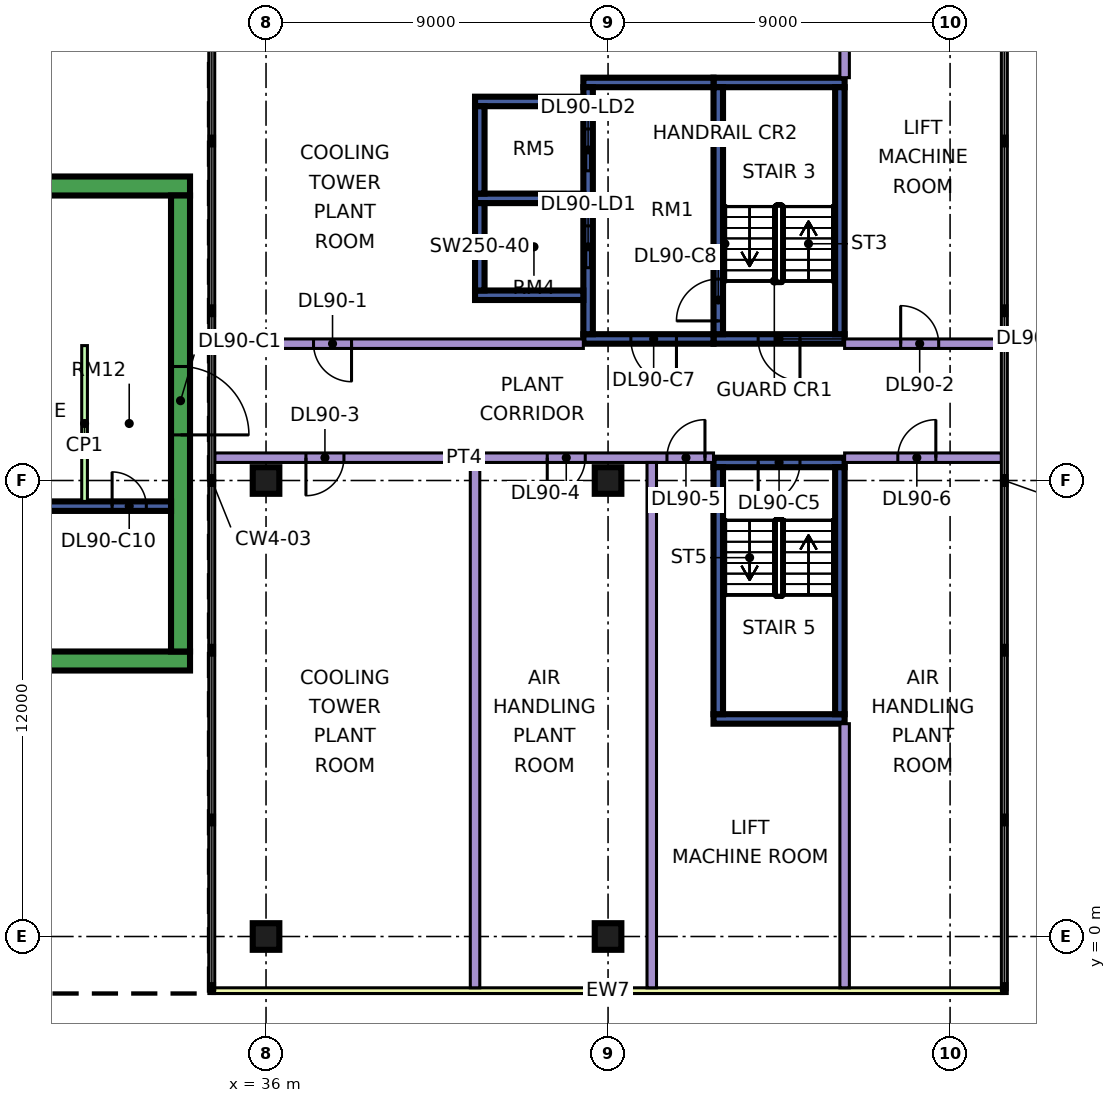
"""IFC4 building model, lengths in metres.
Left out: names, types, materials, properties, quantities, classifications, styles, units other than length and angle.
Written with IfcOpenShell. Run it as: python <this file> out.ifc"""

import sys

from ifc_helpers import new_model, si_unit, direction, frame, frame_2d, origin, origin_2d, place, context, subcontext, project, spatial, rectangle, extrude, element, fill, save


model = new_model("IFC4")
c1 = context("Model", 3, precision=1e-05, world=origin(), true_north=direction((0.0, 1.0)))
c2 = subcontext(c1, "Body", "Model", "MODEL_VIEW")
j1 = project(units=[si_unit("LENGTHUNIT", "METRE"), si_unit("PLANEANGLEUNIT", "RADIAN")], contexts=[c1])
p1 = place(None, origin())
s1 = spatial("IfcSite", under=j1, at=p1, CompositionType="ELEMENT")
p2 = place(p1, origin())
s2 = spatial("IfcBuilding", under=s1, at=p2, CompositionType="ELEMENT")
p3 = place(p2, frame((0.0, 0.0, 383.9)))
s3 = spatial("IfcBuildingStorey", under=s2, at=p3, CompositionType="ELEMENT", Elevation=383.9)
for number, where, z_axis, x_axis in (
    (1, (36.0, 0.0, 0.0), (0.0, 0.0, 1.0), (1.0, 0.0, 0.0)),
    (2, (36.0, 12.0, 0.0), (0.0, 0.0, 1.0), (1.0, 0.0, 0.0)),
    (3, (45.0, 0.0, 0.0), (0.0, 0.0, 1.0), (1.0, 0.0, 0.0)),
    (4, (45.0, 12.0, 0.0), (0.0, 0.0, 1.0), (1.0, 0.0, 0.0)),
):
    element("IfcColumn", number, at=place(p3, frame(where, z_axis=z_axis, x_axis=x_axis)), inside=s3, PredefinedType="COLUMN", context=c2, shape_type="SweptSolid", body=[
        extrude(rectangle(XDim=0.7, YDim=0.7, at=origin_2d()), origin(), (0.0, 0.0, 1.0), 5.0),
    ])
for number, where, z_axis, x_axis in (
    (5, (9.0, 7.25, 0.0), (0.0, 0.0, 1.0), (1.0, 0.0, 0.0)),
    (6, (9.0, 19.75, 0.0), (0.0, 0.0, 1.0), (1.0, 0.0, 0.0)),
):
    element("IfcWall", number, at=place(p3, frame(where, z_axis=z_axis, x_axis=x_axis)), inside=s3, PredefinedType="SHEAR", context=c2, shape_type="SweptSolid", body=[
        extrude(rectangle(XDim=25.0, YDim=0.5, at=frame_2d((12.5, 0.0))), origin(), (0.0, 0.0, 1.0), 5.0),
    ])
p4 = place(p3, frame((33.75, 7.5, 0.0), z_axis=(0.0, 0.0, 1.0), x_axis=(0.0, 1.0, 0.0)))
e7 = element("IfcWall", 7, at=p4, inside=s3, PredefinedType="SHEAR", context=c2, shape_type="SweptSolid", body=[
    extrude(rectangle(XDim=12.0, YDim=0.5, at=frame_2d((6.0, 0.0))), origin(), (0.0, 0.0, 1.0), 5.0),
])
p5 = place(p4, frame((5.7, 0.0, 0.0)))
e8 = element("IfcOpeningElement", 8, at=p5, cuts=e7, PredefinedType="OPENING", context=c2, shape_type="SweptSolid", body=[
    extrude(rectangle(XDim=1.8, YDim=2.4, at=frame_2d((0.9, 1.2))), frame((0.0, 0.26, 0.0), z_axis=(0.0, -1.0, 0.0), x_axis=(1.0, 0.0, 0.0)), (0.0, 0.0, 1.0), 0.52),
])
p6 = place(p3, frame((13.45, 11.325, 0.0), z_axis=(0.0, 0.0, 1.0), x_axis=(1.0, 0.0, 0.0)))
e9 = element("IfcWall", 9, at=p6, inside=s3, PredefinedType="SHEAR", context=c2, shape_type="SweptSolid", body=[
    extrude(rectangle(XDim=20.05, YDim=0.25, at=frame_2d((10.025, 0.0))), origin(), (0.0, 0.0, 1.0), 5.0),
])
p7 = place(p6, frame((4.1, 0.0, 0.0)))
e10 = element("IfcOpeningElement", 10, at=p7, cuts=e9, PredefinedType="OPENING", context=c2, shape_type="SweptSolid", body=[
    extrude(rectangle(XDim=0.9, YDim=2.1, at=frame_2d((0.45, 1.05))), frame((0.0, 0.135, 0.0), z_axis=(0.0, -1.0, 0.0), x_axis=(1.0, 0.0, 0.0)), (0.0, 0.0, 1.0), 0.27),
])
p8 = place(p6, frame((18.5, 0.0, 0.0)))
e11 = element("IfcOpeningElement", 11, at=p8, cuts=e9, PredefinedType="OPENING", context=c2, shape_type="SweptSolid", body=[
    extrude(rectangle(XDim=0.9, YDim=2.1, at=frame_2d((0.45, 1.05))), frame((0.0, 0.135, 0.0), z_axis=(0.0, -1.0, 0.0), x_axis=(1.0, 0.0, 0.0)), (0.0, 0.0, 1.0), 0.27),
])
p9 = place(p3, frame((47.775, 15.725, 0.0), z_axis=(0.0, 0.0, 1.0), x_axis=(1.0, 0.0, 0.0)))
e12 = element("IfcWall", 12, at=p9, inside=s3, PredefinedType="SHEAR", context=c2, shape_type="SweptSolid", body=[
    extrude(rectangle(XDim=3.45, YDim=0.25, at=frame_2d((1.725, 0.0))), origin(), (0.0, 0.0, 1.0), 5.0),
])
p10 = place(p9, frame((1.175, 0.0, 0.0)))
e13 = element("IfcOpeningElement", 13, at=p10, cuts=e12, PredefinedType="OPENING", context=c2, shape_type="SweptSolid", body=[
    extrude(rectangle(XDim=1.1, YDim=2.2, at=frame_2d((0.55, 1.1))), frame((0.0, 0.135, 0.0), z_axis=(0.0, -1.0, 0.0), x_axis=(1.0, 0.0, 0.0)), (0.0, 0.0, 1.0), 0.27),
])
p11 = place(p3, frame((47.775, 22.475, 0.0), z_axis=(0.0, 0.0, 1.0), x_axis=(1.0, 0.0, 0.0)))
e14 = element("IfcWall", 14, at=p11, inside=s3, PredefinedType="SHEAR", context=c2, shape_type="SweptSolid", body=[
    extrude(rectangle(XDim=3.45, YDim=0.25, at=frame_2d((1.725, 0.0))), origin(), (0.0, 0.0, 1.0), 5.0),
])
p12 = place(p3, frame((47.9, 15.85, 0.0), z_axis=(0.0, 0.0, 1.0), x_axis=(0.0, 1.0, 0.0)))
e15 = element("IfcWall", 15, at=p12, inside=s3, PredefinedType="SHEAR", context=c2, shape_type="SweptSolid", body=[
    extrude(rectangle(XDim=6.5, YDim=0.25, at=frame_2d((3.25, 0.0))), origin(), (0.0, 0.0, 1.0), 5.0),
])
p13 = place(p12, frame((0.35, 0.0, 0.0)))
e16 = element("IfcOpeningElement", 16, at=p13, cuts=e15, PredefinedType="OPENING", context=c2, shape_type="SweptSolid", body=[
    extrude(rectangle(XDim=1.1, YDim=2.2, at=frame_2d((0.55, 1.1))), frame((0.0, 0.135, 0.0), z_axis=(0.0, -1.0, 0.0), x_axis=(1.0, 0.0, 0.0)), (0.0, 0.0, 1.0), 0.27),
])
p14 = place(p3, frame((51.1, 15.85, 0.0), z_axis=(0.0, 0.0, 1.0), x_axis=(0.0, 1.0, 0.0)))
e17 = element("IfcWall", 17, at=p14, inside=s3, PredefinedType="SHEAR", context=c2, shape_type="SweptSolid", body=[
    extrude(rectangle(XDim=6.5, YDim=0.25, at=frame_2d((3.25, 0.0))), origin(), (0.0, 0.0, 1.0), 5.0),
])
p15 = place(p3, frame((47.775, 5.725, 0.0), z_axis=(0.0, 0.0, 1.0), x_axis=(1.0, 0.0, 0.0)))
e18 = element("IfcWall", 18, at=p15, inside=s3, PredefinedType="SHEAR", context=c2, shape_type="SweptSolid", body=[
    extrude(rectangle(XDim=3.45, YDim=0.25, at=frame_2d((1.725, 0.0))), origin(), (0.0, 0.0, 1.0), 5.0),
])
p16 = place(p3, frame((47.775, 12.475, 0.0), z_axis=(0.0, 0.0, 1.0), x_axis=(1.0, 0.0, 0.0)))
e19 = element("IfcWall", 19, at=p16, inside=s3, PredefinedType="SHEAR", context=c2, shape_type="SweptSolid", body=[
    extrude(rectangle(XDim=3.45, YDim=0.25, at=frame_2d((1.725, 0.0))), origin(), (0.0, 0.0, 1.0), 5.0),
])
p17 = place(p16, frame((1.175, 0.0, 0.0)))
e20 = element("IfcOpeningElement", 20, at=p17, cuts=e19, PredefinedType="OPENING", context=c2, shape_type="SweptSolid", body=[
    extrude(rectangle(XDim=1.1, YDim=2.2, at=frame_2d((0.55, 1.1))), frame((0.0, 0.135, 0.0), z_axis=(0.0, -1.0, 0.0), x_axis=(1.0, 0.0, 0.0)), (0.0, 0.0, 1.0), 0.27),
])
for number, where, z_axis, x_axis in (
    (21, (47.9, 5.85, 0.0), (0.0, 0.0, 1.0), (0.0, 1.0, 0.0)),
    (22, (51.1, 5.85, 0.0), (0.0, 0.0, 1.0), (0.0, 1.0, 0.0)),
):
    element("IfcWall", number, at=place(p3, frame(where, z_axis=z_axis, x_axis=x_axis)), inside=s3, PredefinedType="SHEAR", context=c2, shape_type="SweptSolid", body=[
        extrude(rectangle(XDim=6.5, YDim=0.25, at=frame_2d((3.25, 0.0))), origin(), (0.0, 0.0, 1.0), 5.0),
    ])
p18 = place(p3, frame((44.35, 15.725, 0.0), z_axis=(0.0, 0.0, 1.0), x_axis=(1.0, 0.0, 0.0)))
e23 = element("IfcWall", 23, at=p18, inside=s3, PredefinedType="SHEAR", context=c2, shape_type="SweptSolid", body=[
    extrude(rectangle(XDim=3.425, YDim=0.25, at=frame_2d((1.712, 0.0))), origin(), (0.0, 0.0, 1.0), 5.0),
])
p19 = place(p18, frame((1.25, 0.0, 0.0)))
e24 = element("IfcOpeningElement", 24, at=p19, cuts=e23, PredefinedType="OPENING", context=c2, shape_type="SweptSolid", body=[
    extrude(rectangle(XDim=1.2, YDim=2.2, at=frame_2d((0.6, 1.1))), frame((0.0, 0.135, 0.0), z_axis=(0.0, -1.0, 0.0), x_axis=(1.0, 0.0, 0.0)), (0.0, 0.0, 1.0), 0.27),
])
p20 = place(p3, frame((44.35, 22.475, 0.0), z_axis=(0.0, 0.0, 1.0), x_axis=(1.0, 0.0, 0.0)))
e25 = element("IfcWall", 25, at=p20, inside=s3, PredefinedType="SHEAR", context=c2, shape_type="SweptSolid", body=[
    extrude(rectangle(XDim=3.425, YDim=0.25, at=frame_2d((1.712, 0.0))), origin(), (0.0, 0.0, 1.0), 5.0),
])
p21 = place(p3, frame((44.475, 15.85, 0.0), z_axis=(0.0, 0.0, 1.0), x_axis=(0.0, 1.0, 0.0)))
e26 = element("IfcWall", 26, at=p21, inside=s3, PredefinedType="SHEAR", context=c2, shape_type="SweptSolid", body=[
    extrude(rectangle(XDim=6.5, YDim=0.25, at=frame_2d((3.25, 0.0))), origin(), (0.0, 0.0, 1.0), 5.0),
])
p22 = place(p21, frame((1.75, 0.0, 0.0)))
e27 = element("IfcOpeningElement", 27, at=p22, cuts=e26, PredefinedType="OPENING", context=c2, shape_type="SweptSolid", body=[
    extrude(rectangle(XDim=1.1, YDim=2.2, at=frame_2d((0.55, 1.1))), frame((0.0, 0.135, 0.0), z_axis=(0.0, -1.0, 0.0), x_axis=(1.0, 0.0, 0.0)), (0.0, 0.0, 1.0), 0.27),
])
p23 = place(p21, frame((4.3, 0.0, 0.0)))
e28 = element("IfcOpeningElement", 28, at=p23, cuts=e26, PredefinedType="OPENING", context=c2, shape_type="SweptSolid", body=[
    extrude(rectangle(XDim=1.1, YDim=2.2, at=frame_2d((0.55, 1.1))), frame((0.0, 0.135, 0.0), z_axis=(0.0, -1.0, 0.0), x_axis=(1.0, 0.0, 0.0)), (0.0, 0.0, 1.0), 0.27),
])
for number, where, z_axis, x_axis in (
    (29, (41.5, 16.875, 0.0), (0.0, 0.0, 1.0), (1.0, 0.0, 0.0)),
    (30, (41.5, 19.425, 0.0), (0.0, 0.0, 1.0), (1.0, 0.0, 0.0)),
    (31, (41.5, 21.975, 0.0), (0.0, 0.0, 1.0), (1.0, 0.0, 0.0)),
):
    element("IfcWall", number, at=place(p3, frame(where, z_axis=z_axis, x_axis=x_axis)), inside=s3, PredefinedType="SHEAR", context=c2, shape_type="SweptSolid", body=[
        extrude(rectangle(XDim=2.85, YDim=0.25, at=frame_2d((1.425, 0.0))), origin(), (0.0, 0.0, 1.0), 5.0),
    ])
for number, where, z_axis, x_axis in (
    (32, (41.625, 17.0, 0.0), (0.0, 0.0, 1.0), (0.0, 1.0, 0.0)),
    (33, (41.625, 19.55, 0.0), (0.0, 0.0, 1.0), (0.0, 1.0, 0.0)),
):
    element("IfcWall", number, at=place(p3, frame(where, z_axis=z_axis, x_axis=x_axis)), inside=s3, PredefinedType="SHEAR", context=c2, shape_type="SweptSolid", body=[
        extrude(rectangle(XDim=2.3, YDim=0.25, at=frame_2d((1.15, 0.0))), origin(), (0.0, 0.0, 1.0), 5.0),
    ])
p24 = place(p3, frame((34.6, -1.425, 0.0), z_axis=(0.0, 0.0, 1.0), x_axis=(1.0, 0.0, 0.0)))
e34 = element("IfcWall", 34, at=p24, inside=s3, PredefinedType="SOLIDWALL", context=c2, shape_type="SweptSolid", body=[
    extrude(rectangle(XDim=20.8, YDim=0.15, at=frame_2d((10.4, 0.0))), origin(), (0.0, 0.0, 1.0), 4.6),
])
p25 = place(p3, frame((31.225, 11.45, 0.0), z_axis=(0.0, 0.0, 1.0), x_axis=(0.0, 1.0, 0.0)))
e35 = element("IfcWall", 35, at=p25, inside=s3, PredefinedType="PARTITIONING", context=c2, shape_type="SweptSolid", body=[
    extrude(rectangle(XDim=4.1, YDim=0.15, at=frame_2d((2.05, 0.0))), origin(), (0.0, 0.0, 1.0), 4.6),
])
p26 = place(p3, frame((34.65, 12.6, 0.0), z_axis=(0.0, 0.0, 1.0), x_axis=(1.0, 0.0, 0.0)))
e36 = element("IfcWall", 36, at=p26, inside=s3, PredefinedType="PARTITIONING", context=c2, shape_type="SweptSolid", body=[
    extrude(rectangle(XDim=13.125, YDim=0.25, at=frame_2d((6.562, 0.0))), origin(), (0.0, 0.0, 1.0), 4.6),
])
p27 = place(p26, frame((2.4, 0.0, 0.0)))
e37 = element("IfcOpeningElement", 37, at=p27, cuts=e36, PredefinedType="OPENING", context=c2, shape_type="SweptSolid", body=[
    extrude(rectangle(XDim=1.0, YDim=2.1, at=frame_2d((0.5, 1.05))), frame((0.0, 0.135, 0.0), z_axis=(0.0, -1.0, 0.0), x_axis=(1.0, 0.0, 0.0)), (0.0, 0.0, 1.0), 0.27),
])
p28 = place(p26, frame((8.75, 0.0, 0.0)))
e38 = element("IfcOpeningElement", 38, at=p28, cuts=e36, PredefinedType="OPENING", context=c2, shape_type="SweptSolid", body=[
    extrude(rectangle(XDim=1.0, YDim=2.1, at=frame_2d((0.5, 1.05))), frame((0.0, 0.135, 0.0), z_axis=(0.0, -1.0, 0.0), x_axis=(1.0, 0.0, 0.0)), (0.0, 0.0, 1.0), 0.27),
])
p29 = place(p26, frame((11.9, 0.0, 0.0)))
e39 = element("IfcOpeningElement", 39, at=p29, cuts=e36, PredefinedType="OPENING", context=c2, shape_type="SweptSolid", body=[
    extrude(rectangle(XDim=1.0, YDim=2.1, at=frame_2d((0.5, 1.05))), frame((0.0, 0.135, 0.0), z_axis=(0.0, -1.0, 0.0), x_axis=(1.0, 0.0, 0.0)), (0.0, 0.0, 1.0), 0.27),
])
p30 = place(p3, frame((34.65, 15.6, 0.0), z_axis=(0.0, 0.0, 1.0), x_axis=(1.0, 0.0, 0.0)))
e40 = element("IfcWall", 40, at=p30, inside=s3, PredefinedType="PARTITIONING", context=c2, shape_type="SweptSolid", body=[
    extrude(rectangle(XDim=9.7, YDim=0.25, at=frame_2d((4.85, 0.0))), origin(), (0.0, 0.0, 1.0), 4.6),
])
p31 = place(p30, frame((2.6, 0.0, 0.0)))
e41 = element("IfcOpeningElement", 41, at=p31, cuts=e40, PredefinedType="OPENING", context=c2, shape_type="SweptSolid", body=[
    extrude(rectangle(XDim=1.0, YDim=2.1, at=frame_2d((0.5, 1.05))), frame((0.0, 0.135, 0.0), z_axis=(0.0, -1.0, 0.0), x_axis=(1.0, 0.0, 0.0)), (0.0, 0.0, 1.0), 0.27),
])
for number, where, z_axis, x_axis in (
    (42, (41.5, -1.35, 0.0), (0.0, 0.0, 1.0), (0.0, 1.0, 0.0)),
    (43, (46.15, -1.35, 0.0), (0.0, 0.0, 1.0), (0.0, 1.0, 0.0)),
):
    element("IfcWall", number, at=place(p3, frame(where, z_axis=z_axis, x_axis=x_axis)), inside=s3, PredefinedType="PARTITIONING", context=c2, shape_type="SweptSolid", body=[
        extrude(rectangle(XDim=13.825, YDim=0.25, at=frame_2d((6.913, 0.0))), origin(), (0.0, 0.0, 1.0), 4.6),
    ])
p32 = place(p3, frame((51.225, -1.35, 0.0), z_axis=(0.0, 0.0, 1.0), x_axis=(0.0, 1.0, 0.0)))
e44 = element("IfcWall", 44, at=p32, inside=s3, PredefinedType="PARTITIONING", context=c2, shape_type="SweptSolid", body=[
    extrude(rectangle(XDim=6.95, YDim=0.25, at=frame_2d((3.475, 0.0))), origin(), (0.0, 0.0, 1.0), 4.6),
])
p33 = place(p3, frame((51.225, 12.6, 0.0), z_axis=(0.0, 0.0, 1.0), x_axis=(1.0, 0.0, 0.0)))
e45 = element("IfcWall", 45, at=p33, inside=s3, PredefinedType="PARTITIONING", context=c2, shape_type="SweptSolid", body=[
    extrude(rectangle(XDim=4.125, YDim=0.25, at=frame_2d((2.062, 0.0))), origin(), (0.0, 0.0, 1.0), 4.6),
])
p34 = place(p33, frame((1.4, 0.0, 0.0)))
e46 = element("IfcOpeningElement", 46, at=p34, cuts=e45, PredefinedType="OPENING", context=c2, shape_type="SweptSolid", body=[
    extrude(rectangle(XDim=1.0, YDim=2.1, at=frame_2d((0.5, 1.05))), frame((0.0, 0.135, 0.0), z_axis=(0.0, -1.0, 0.0), x_axis=(1.0, 0.0, 0.0)), (0.0, 0.0, 1.0), 0.27),
])
p35 = place(p3, frame((51.225, 15.6, 0.0), z_axis=(0.0, 0.0, 1.0), x_axis=(1.0, 0.0, 0.0)))
e47 = element("IfcWall", 47, at=p35, inside=s3, PredefinedType="PARTITIONING", context=c2, shape_type="SweptSolid", body=[
    extrude(rectangle(XDim=4.125, YDim=0.25, at=frame_2d((2.062, 0.0))), origin(), (0.0, 0.0, 1.0), 4.6),
])
p36 = place(p35, frame((1.475, 0.0, 0.0)))
e48 = element("IfcOpeningElement", 48, at=p36, cuts=e47, PredefinedType="OPENING", context=c2, shape_type="SweptSolid", body=[
    extrude(rectangle(XDim=1.0, YDim=2.1, at=frame_2d((0.5, 1.05))), frame((0.0, 0.135, 0.0), z_axis=(0.0, -1.0, 0.0), x_axis=(1.0, 0.0, 0.0)), (0.0, 0.0, 1.0), 0.27),
])
p37 = place(p3, frame((51.225, 22.6, 0.0), z_axis=(0.0, 0.0, 1.0), x_axis=(0.0, 1.0, 0.0)))
e49 = element("IfcWall", 49, at=p37, inside=s3, PredefinedType="PARTITIONING", context=c2, shape_type="SweptSolid", body=[
    extrude(rectangle(XDim=2.75, YDim=0.25, at=frame_2d((1.375, 0.0))), origin(), (0.0, 0.0, 1.0), 4.6),
])
p38 = place(p5, frame((1.8, 0.0, 0.0), z_axis=(0.0, 0.0, 1.0), x_axis=(-1.0, 0.0, 0.0)))
e50 = element("IfcDoor", 50, at=p38, inside=s3, OperationType="DOUBLE_DOOR_SINGLE_SWING", PredefinedType="DOOR", context=c2, shape_type="SweptSolid", body=[
    extrude(rectangle(XDim=1.8, YDim=2.4, at=frame_2d((0.9, 1.2))), frame((0.0, 0.025, 0.0), z_axis=(0.0, -1.0, 0.0), x_axis=(1.0, 0.0, 0.0)), (0.0, 0.0, 1.0), 0.05),
])
fill(e8, e50)
p39 = place(p10, origin())
e51 = element("IfcDoor", 51, at=p39, inside=s3, OperationType="SINGLE_SWING_RIGHT", PredefinedType="DOOR", context=c2, shape_type="SweptSolid", body=[
    extrude(rectangle(XDim=1.1, YDim=2.2, at=frame_2d((0.55, 1.1))), frame((0.0, 0.025, 0.0), z_axis=(0.0, -1.0, 0.0), x_axis=(1.0, 0.0, 0.0)), (0.0, 0.0, 1.0), 0.05),
])
fill(e13, e51)
p40 = place(p17, frame((1.1, 0.0, 0.0), z_axis=(0.0, 0.0, 1.0), x_axis=(-1.0, 0.0, 0.0)))
e52 = element("IfcDoor", 52, at=p40, inside=s3, OperationType="SINGLE_SWING_LEFT", PredefinedType="DOOR", context=c2, shape_type="SweptSolid", body=[
    extrude(rectangle(XDim=1.1, YDim=2.2, at=frame_2d((0.55, 1.1))), frame((0.0, 0.025, 0.0), z_axis=(0.0, -1.0, 0.0), x_axis=(1.0, 0.0, 0.0)), (0.0, 0.0, 1.0), 0.05),
])
fill(e20, e52)
p41 = place(p19, origin())
e53 = element("IfcDoor", 53, at=p41, inside=s3, OperationType="SINGLE_SWING_RIGHT", PredefinedType="DOOR", context=c2, shape_type="SweptSolid", body=[
    extrude(rectangle(XDim=1.2, YDim=2.2, at=frame_2d((0.6, 1.1))), frame((0.0, 0.025, 0.0), z_axis=(0.0, -1.0, 0.0), x_axis=(1.0, 0.0, 0.0)), (0.0, 0.0, 1.0), 0.05),
])
fill(e24, e53)
p42 = place(p13, origin())
e54 = element("IfcDoor", 54, at=p42, inside=s3, OperationType="SINGLE_SWING_LEFT", PredefinedType="DOOR", context=c2, shape_type="SweptSolid", body=[
    extrude(rectangle(XDim=1.1, YDim=2.2, at=frame_2d((0.55, 1.1))), frame((0.0, 0.025, 0.0), z_axis=(0.0, -1.0, 0.0), x_axis=(1.0, 0.0, 0.0)), (0.0, 0.0, 1.0), 0.05),
])
fill(e16, e54)
p43 = place(p22, origin())
e55 = element("IfcDoor", 55, at=p43, inside=s3, OperationType="DOUBLE_DOOR_SLIDING", PredefinedType="DOOR", context=c2, shape_type="SweptSolid", body=[
    extrude(rectangle(XDim=1.1, YDim=2.2, at=frame_2d((0.55, 1.1))), frame((0.0, 0.025, 0.0), z_axis=(0.0, -1.0, 0.0), x_axis=(1.0, 0.0, 0.0)), (0.0, 0.0, 1.0), 0.05),
])
fill(e27, e55)
p44 = place(p23, origin())
e56 = element("IfcDoor", 56, at=p44, inside=s3, OperationType="DOUBLE_DOOR_SLIDING", PredefinedType="DOOR", context=c2, shape_type="SweptSolid", body=[
    extrude(rectangle(XDim=1.1, YDim=2.2, at=frame_2d((0.55, 1.1))), frame((0.0, 0.025, 0.0), z_axis=(0.0, -1.0, 0.0), x_axis=(1.0, 0.0, 0.0)), (0.0, 0.0, 1.0), 0.05),
])
fill(e28, e56)
p45 = place(p8, origin())
e57 = element("IfcDoor", 57, at=p45, inside=s3, OperationType="SINGLE_SWING_LEFT", PredefinedType="DOOR", context=c2, shape_type="SweptSolid", body=[
    extrude(rectangle(XDim=0.9, YDim=2.1, at=frame_2d((0.45, 1.05))), frame((0.0, 0.025, 0.0), z_axis=(0.0, -1.0, 0.0), x_axis=(1.0, 0.0, 0.0)), (0.0, 0.0, 1.0), 0.05),
])
fill(e11, e57)
p46 = place(p31, origin())
e58 = element("IfcDoor", 58, at=p46, inside=s3, OperationType="SINGLE_SWING_RIGHT", PredefinedType="DOOR", context=c2, shape_type="SweptSolid", body=[
    extrude(rectangle(XDim=1.0, YDim=2.1, at=frame_2d((0.5, 1.05))), frame((0.0, 0.025, 0.0), z_axis=(0.0, -1.0, 0.0), x_axis=(1.0, 0.0, 0.0)), (0.0, 0.0, 1.0), 0.05),
])
fill(e41, e58)
p47 = place(p36, origin())
e59 = element("IfcDoor", 59, at=p47, inside=s3, OperationType="SINGLE_SWING_LEFT", PredefinedType="DOOR", context=c2, shape_type="SweptSolid", body=[
    extrude(rectangle(XDim=1.0, YDim=2.1, at=frame_2d((0.5, 1.05))), frame((0.0, 0.025, 0.0), z_axis=(0.0, -1.0, 0.0), x_axis=(1.0, 0.0, 0.0)), (0.0, 0.0, 1.0), 0.05),
])
fill(e48, e59)
p48 = place(p27, frame((1.0, 0.0, 0.0), z_axis=(0.0, 0.0, 1.0), x_axis=(-1.0, 0.0, 0.0)))
e60 = element("IfcDoor", 60, at=p48, inside=s3, OperationType="SINGLE_SWING_LEFT", PredefinedType="DOOR", context=c2, shape_type="SweptSolid", body=[
    extrude(rectangle(XDim=1.0, YDim=2.1, at=frame_2d((0.5, 1.05))), frame((0.0, 0.025, 0.0), z_axis=(0.0, -1.0, 0.0), x_axis=(1.0, 0.0, 0.0)), (0.0, 0.0, 1.0), 0.05),
])
fill(e37, e60)
p49 = place(p28, frame((1.0, 0.0, 0.0), z_axis=(0.0, 0.0, 1.0), x_axis=(-1.0, 0.0, 0.0)))
e61 = element("IfcDoor", 61, at=p49, inside=s3, OperationType="SINGLE_SWING_LEFT", PredefinedType="DOOR", context=c2, shape_type="SweptSolid", body=[
    extrude(rectangle(XDim=1.0, YDim=2.1, at=frame_2d((0.5, 1.05))), frame((0.0, 0.025, 0.0), z_axis=(0.0, -1.0, 0.0), x_axis=(1.0, 0.0, 0.0)), (0.0, 0.0, 1.0), 0.05),
])
fill(e38, e61)
p50 = place(p29, frame((1.0, 0.0, 0.0), z_axis=(0.0, 0.0, 1.0), x_axis=(-1.0, 0.0, 0.0)))
e62 = element("IfcDoor", 62, at=p50, inside=s3, OperationType="SINGLE_SWING_RIGHT", PredefinedType="DOOR", context=c2, shape_type="SweptSolid", body=[
    extrude(rectangle(XDim=1.0, YDim=2.1, at=frame_2d((0.5, 1.05))), frame((0.0, 0.025, 0.0), z_axis=(0.0, -1.0, 0.0), x_axis=(1.0, 0.0, 0.0)), (0.0, 0.0, 1.0), 0.05),
])
fill(e39, e62)
p51 = place(p34, frame((1.0, 0.0, 0.0), z_axis=(0.0, 0.0, 1.0), x_axis=(-1.0, 0.0, 0.0)))
e63 = element("IfcDoor", 63, at=p51, inside=s3, OperationType="SINGLE_SWING_RIGHT", PredefinedType="DOOR", context=c2, shape_type="SweptSolid", body=[
    extrude(rectangle(XDim=1.0, YDim=2.1, at=frame_2d((0.5, 1.05))), frame((0.0, 0.025, 0.0), z_axis=(0.0, -1.0, 0.0), x_axis=(1.0, 0.0, 0.0)), (0.0, 0.0, 1.0), 0.05),
])
fill(e46, e63)
save(model, sys.argv[1])
